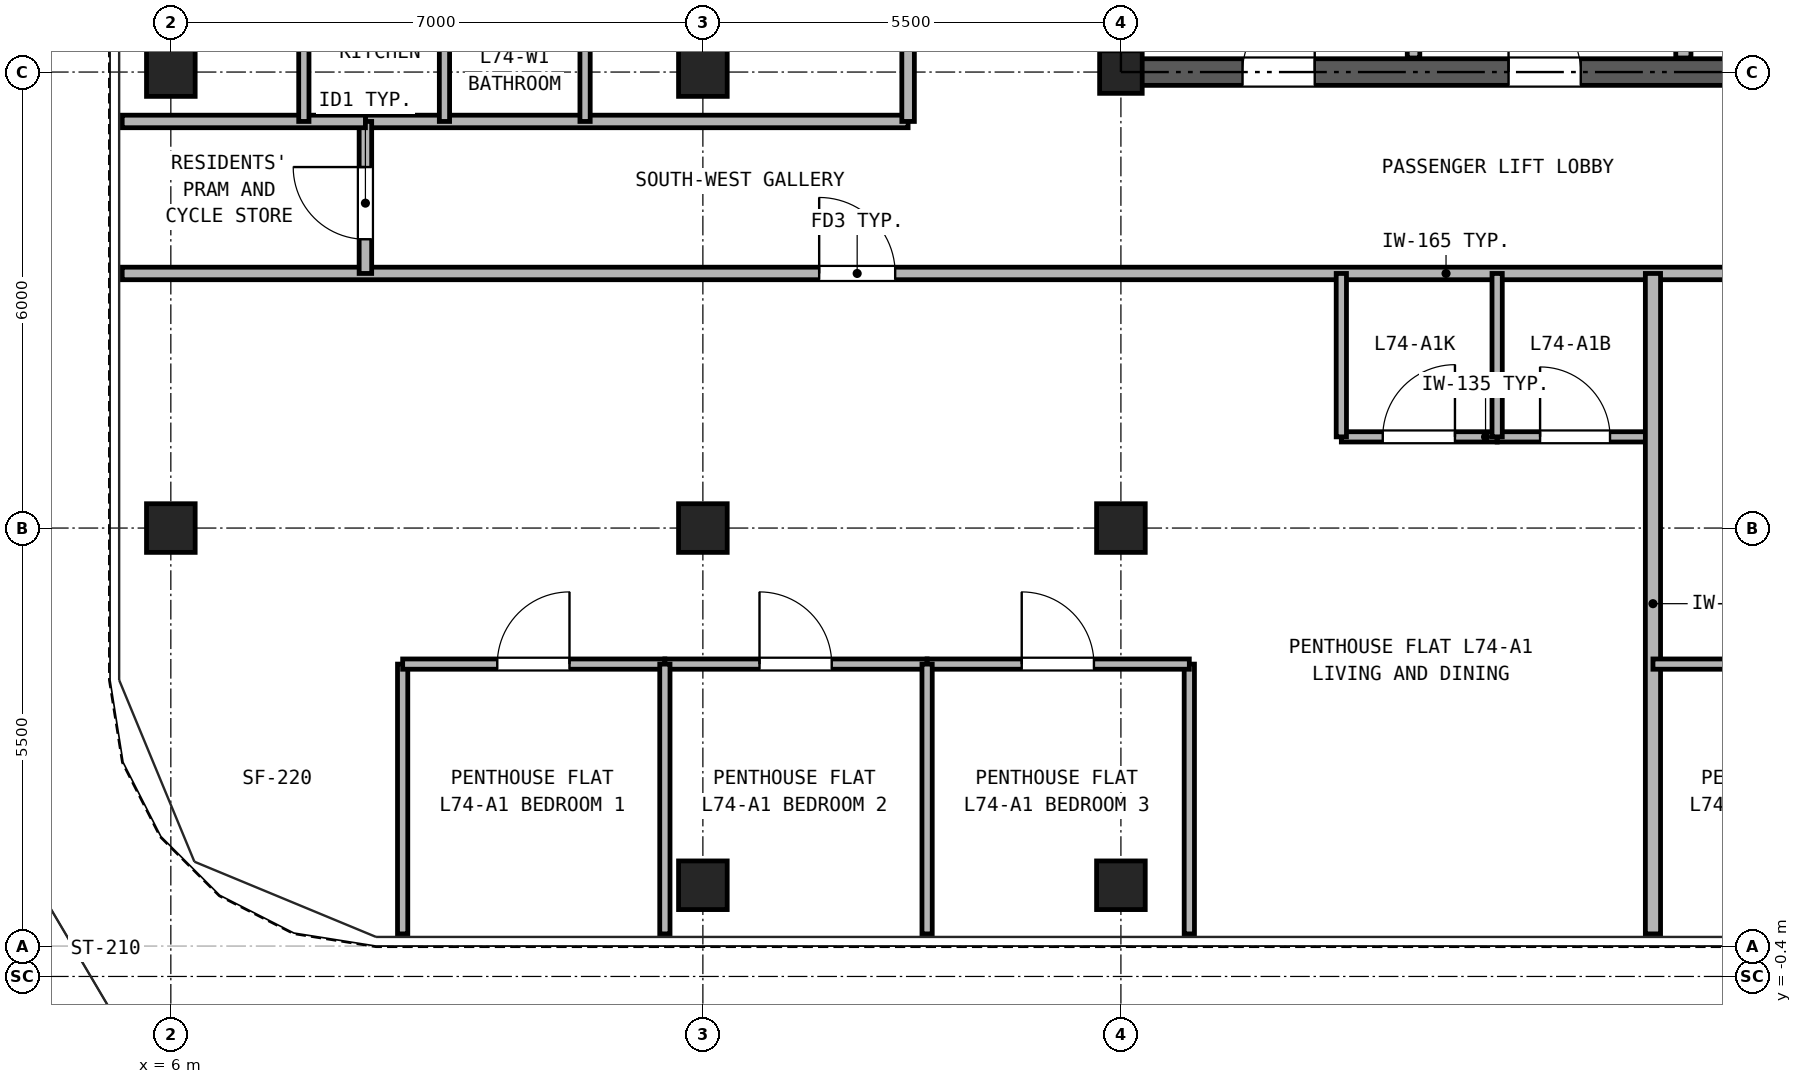
"""IFC4 building model, lengths in metres.
Left out: names, types, materials, properties, quantities, classifications, styles, units other than length and angle.
Written with IfcOpenShell. Run it as: python <this file> out.ifc"""

import sys

from ifc_helpers import new_model, si_unit, direction, frame, frame_2d, origin, origin_2d, place, context, subcontext, project, spatial, rectangle, hollow_rectangle, extrude, source, transform, mapped, element, fill, save


model = new_model("IFC4")
c1 = context("Model", 3, precision=1e-05, world=origin(), true_north=direction((0.0, 1.0)))
c2 = subcontext(c1, "Body", "Model", "MODEL_VIEW")
j1 = project(units=[si_unit("LENGTHUNIT", "METRE"), si_unit("PLANEANGLEUNIT", "RADIAN")], contexts=[c1])
p1 = place(None, origin())
s1 = spatial("IfcSite", under=j1, at=p1, CompositionType="ELEMENT")
p2 = place(p1, origin())
s2 = spatial("IfcBuilding", under=s1, at=p2, CompositionType="ELEMENT")
p3 = place(p2, frame((0.0, 0.0, 258.5)))
s3 = spatial("IfcBuildingStorey", under=s2, at=p3, CompositionType="ELEMENT", Elevation=258.5)
m1 = source(origin(), c2, "Body", "SweptSolid", [
    extrude(hollow_rectangle(XDim=0.64, YDim=0.64, WallThickness=0.035, at=origin_2d()), origin(), (0.0, 0.0, 1.0), 2.98),
])
for number, where, z_axis, x_axis in (
    (1, (13.0, 0.8, 0.0), (0.0, 0.0, 1.0), (1.0, 0.0, 0.0)),
    (2, (18.5, 0.8, 0.0), (0.0, 0.0, 1.0), (1.0, 0.0, 0.0)),
    (3, (6.0, 5.5, 0.0), (0.0, 0.0, 1.0), (1.0, 0.0, 0.0)),
    (4, (6.0, 11.5, 0.0), (0.0, 0.0, 1.0), (1.0, 0.0, 0.0)),
    (5, (13.0, 5.5, 0.0), (0.0, 0.0, 1.0), (1.0, 0.0, 0.0)),
    (6, (13.0, 11.5, 0.0), (0.0, 0.0, 1.0), (1.0, 0.0, 0.0)),
    (7, (18.5, 5.5, 0.0), (0.0, 0.0, 1.0), (1.0, 0.0, 0.0)),
):
    element("IfcColumn", number, at=place(p3, frame(where, z_axis=z_axis, x_axis=x_axis)), inside=s3, PredefinedType="COLUMN", context=c2, shape_type="MappedRepresentation", body=[
        mapped(m1, transform((0.0, 0.0, 0.0), x_axis=(1.0, 0.0, 0.0), y_axis=(0.0, 1.0, 0.0), z_axis=(0.0, 0.0, 1.0), scale=1.0)),
    ])
m2 = source(origin(), c2, "Body", "SweptSolid", [
    extrude(hollow_rectangle(XDim=0.56, YDim=0.56, WallThickness=0.03, at=origin_2d()), origin(), (0.0, 0.0, 1.0), 2.98),
])
p4 = place(p3, frame((18.5, 11.5, 0.0), z_axis=(0.0, 0.0, 1.0), x_axis=(1.0, 0.0, 0.0)))
e8 = element("IfcColumn", 8, at=p4, inside=s3, PredefinedType="COLUMN", context=c2, shape_type="MappedRepresentation", body=[
    mapped(m2, transform((0.0, 0.0, 0.0), x_axis=(1.0, 0.0, 0.0), y_axis=(0.0, 1.0, 0.0), z_axis=(0.0, 0.0, 1.0), scale=1.0)),
])
p5 = place(p3, frame((18.325, 11.5, 0.0), z_axis=(0.0, 0.0, 1.0), x_axis=(1.0, 0.0, 0.0)))
e9 = element("IfcWall", 9, at=p5, inside=s3, PredefinedType="SHEAR", context=c2, shape_type="SweptSolid", body=[
    extrude(rectangle(XDim=10.35, YDim=0.35, at=frame_2d((5.175, 0.0))), origin(), (0.0, 0.0, 1.0), 2.98),
])
p6 = place(p5, frame((1.775, 0.0, 0.0)))
e10 = element("IfcOpeningElement", 10, at=p6, cuts=e9, PredefinedType="OPENING", context=c2, shape_type="SweptSolid", body=[
    extrude(rectangle(XDim=0.95, YDim=2.15, at=frame_2d((0.475, 1.075))), frame((0.0, 0.185, 0.0), z_axis=(0.0, -1.0, 0.0), x_axis=(1.0, 0.0, 0.0)), (0.0, 0.0, 1.0), 0.37),
])
p7 = place(p5, frame((5.275, 0.0, 0.0)))
e11 = element("IfcOpeningElement", 11, at=p7, cuts=e9, PredefinedType="OPENING", context=c2, shape_type="SweptSolid", body=[
    extrude(rectangle(XDim=0.95, YDim=2.15, at=frame_2d((0.475, 1.075))), frame((0.0, 0.185, 0.0), z_axis=(0.0, -1.0, 0.0), x_axis=(1.0, 0.0, 0.0)), (0.0, 0.0, 1.0), 0.37),
])
p8 = place(p5, frame((8.175, 0.0, 0.0)))
e12 = element("IfcOpeningElement", 12, at=p8, cuts=e9, PredefinedType="OPENING", context=c2, shape_type="SweptSolid", body=[
    extrude(rectangle(XDim=1.1, YDim=2.25, at=frame_2d((0.55, 1.125))), frame((0.0, 0.185, 0.0), z_axis=(0.0, -1.0, 0.0), x_axis=(1.0, 0.0, 0.0)), (0.0, 0.0, 1.0), 0.37),
])
p9 = place(p3, frame((18.5, 11.675, 0.0), z_axis=(0.0, 0.0, 1.0), x_axis=(0.0, 1.0, 0.0)))
e13 = element("IfcWall", 13, at=p9, inside=s3, PredefinedType="SHEAR", context=c2, shape_type="SweptSolid", body=[
    extrude(rectangle(XDim=16.9, YDim=0.35, at=frame_2d((8.45, 0.0))), origin(), (0.0, 0.0, 1.0), 2.98),
])
p10 = place(p9, frame((7.475, 0.0, 0.0)))
e14 = element("IfcOpeningElement", 14, at=p10, cuts=e13, PredefinedType="OPENING", context=c2, shape_type="SweptSolid", body=[
    extrude(rectangle(XDim=1.15, YDim=2.2, at=frame_2d((0.575, 1.1))), frame((0.0, 0.185, 0.0), z_axis=(0.0, -1.0, 0.0), x_axis=(1.0, 0.0, 0.0)), (0.0, 0.0, 1.0), 0.37),
])
p11 = place(p3, frame((22.35, 11.685, 0.0), z_axis=(0.0, 0.0, 1.0), x_axis=(0.0, 1.0, 0.0)))
e15 = element("IfcWall", 15, at=p11, inside=s3, PredefinedType="PARTITIONING", context=c2, shape_type="SweptSolid", body=[
    extrude(rectangle(XDim=3.315, YDim=0.165, at=frame_2d((1.657, 0.0))), origin(), (0.0, 0.0, 1.0), 2.98),
])
p12 = place(p3, frame((25.9, 11.685, 0.0), z_axis=(0.0, 0.0, 1.0), x_axis=(0.0, 1.0, 0.0)))
e16 = element("IfcWall", 16, at=p12, inside=s3, PredefinedType="PARTITIONING", context=c2, shape_type="SweptSolid", body=[
    extrude(rectangle(XDim=3.315, YDim=0.2, at=frame_2d((1.657, 0.0))), origin(), (0.0, 0.0, 1.0), 2.98),
])
p13 = place(p3, frame((5.36, 8.85, 0.0), z_axis=(0.0, 0.0, 1.0), x_axis=(1.0, 0.0, 0.0)))
e17 = element("IfcWall", 17, at=p13, inside=s3, PredefinedType="PARTITIONING", context=c2, shape_type="SweptSolid", body=[
    extrude(rectangle(XDim=36.28, YDim=0.165, at=frame_2d((18.14, 0.0))), origin(), (0.0, 0.0, 1.0), 2.98),
])
p14 = place(p13, frame((9.17, 0.0, 0.0)))
e18 = element("IfcOpeningElement", 18, at=p14, cuts=e17, PredefinedType="OPENING", context=c2, shape_type="SweptSolid", body=[
    extrude(rectangle(XDim=1.0, YDim=2.15, at=frame_2d((0.5, 1.075))), frame((0.0, 0.093, 0.0), z_axis=(0.0, -1.0, 0.0), x_axis=(1.0, 0.0, 0.0)), (0.0, 0.0, 1.0), 0.185),
])
p15 = place(p13, frame((24.665, 0.0, 0.0)))
e19 = element("IfcOpeningElement", 19, at=p15, cuts=e17, PredefinedType="OPENING", context=c2, shape_type="SweptSolid", body=[
    extrude(rectangle(XDim=1.0, YDim=2.15, at=frame_2d((0.5, 1.075))), frame((0.0, 0.093, 0.0), z_axis=(0.0, -1.0, 0.0), x_axis=(1.0, 0.0, 0.0)), (0.0, 0.0, 1.0), 0.185),
])
p16 = place(p3, frame((8.56, 10.85, 0.0), z_axis=(0.0, 0.0, 1.0), x_axis=(1.0, 0.0, 0.0)))
e20 = element("IfcWall", 20, at=p16, inside=s3, PredefinedType="PARTITIONING", context=c2, shape_type="SweptSolid", body=[
    extrude(rectangle(XDim=7.14, YDim=0.165, at=frame_2d((3.57, 0.0))), origin(), (0.0, 0.0, 1.0), 2.98),
])
p17 = place(p3, frame((8.56, 8.85, 0.0), z_axis=(0.0, 0.0, 1.0), x_axis=(0.0, 1.0, 0.0)))
e21 = element("IfcWall", 21, at=p17, inside=s3, PredefinedType="PARTITIONING", context=c2, shape_type="SweptSolid", body=[
    extrude(rectangle(XDim=2.0, YDim=0.165, at=frame_2d((1.0, 0.0))), origin(), (0.0, 0.0, 1.0), 2.98),
])
p18 = place(p17, frame((0.45, 0.0, 0.0)))
e22 = element("IfcOpeningElement", 22, at=p18, cuts=e21, PredefinedType="OPENING", context=c2, shape_type="SweptSolid", body=[
    extrude(rectangle(XDim=0.95, YDim=2.15, at=frame_2d((0.475, 1.075))), frame((0.0, 0.093, 0.0), z_axis=(0.0, -1.0, 0.0), x_axis=(1.0, 0.0, 0.0)), (0.0, 0.0, 1.0), 0.185),
])
p19 = place(p3, frame((15.7, 10.85, 0.0), z_axis=(0.0, 0.0, 1.0), x_axis=(0.0, 1.0, 0.0)))
e23 = element("IfcWall", 23, at=p19, inside=s3, PredefinedType="PARTITIONING", context=c2, shape_type="SweptSolid", body=[
    extrude(rectangle(XDim=24.29, YDim=0.165, at=frame_2d((12.145, 0.0))), origin(), (0.0, 0.0, 1.0), 2.98),
])
p20 = place(p19, frame((3.475, 0.0, 0.0)))
e24 = element("IfcOpeningElement", 24, at=p20, cuts=e23, PredefinedType="OPENING", context=c2, shape_type="SweptSolid", body=[
    extrude(rectangle(XDim=1.0, YDim=2.15, at=frame_2d((0.5, 1.075))), frame((0.0, 0.093, 0.0), z_axis=(0.0, -1.0, 0.0), x_axis=(1.0, 0.0, 0.0)), (0.0, 0.0, 1.0), 0.185),
])
p21 = place(p19, frame((11.55, 0.0, 0.0)))
e25 = element("IfcOpeningElement", 25, at=p21, cuts=e23, PredefinedType="OPENING", context=c2, shape_type="SweptSolid", body=[
    extrude(rectangle(XDim=1.0, YDim=2.15, at=frame_2d((0.5, 1.075))), frame((0.0, 0.093, 0.0), z_axis=(0.0, -1.0, 0.0), x_axis=(1.0, 0.0, 0.0)), (0.0, 0.0, 1.0), 0.185),
])
p22 = place(p19, frame((17.55, 0.0, 0.0)))
e26 = element("IfcOpeningElement", 26, at=p22, cuts=e23, PredefinedType="OPENING", context=c2, shape_type="SweptSolid", body=[
    extrude(rectangle(XDim=1.0, YDim=2.15, at=frame_2d((0.5, 1.075))), frame((0.0, 0.093, 0.0), z_axis=(0.0, -1.0, 0.0), x_axis=(1.0, 0.0, 0.0)), (0.0, 0.0, 1.0), 0.185),
])
p23 = place(p3, frame((21.4, 6.7, 0.0), z_axis=(0.0, 0.0, 1.0), x_axis=(1.0, 0.0, 0.0)))
e27 = element("IfcWall", 27, at=p23, inside=s3, PredefinedType="PARTITIONING", context=c2, shape_type="SweptSolid", body=[
    extrude(rectangle(XDim=2.05, YDim=0.135, at=frame_2d((1.025, 0.0))), origin(), (0.0, 0.0, 1.0), 2.98),
])
p24 = place(p23, frame((0.545, 0.0, 0.0)))
e28 = element("IfcOpeningElement", 28, at=p24, cuts=e27, PredefinedType="OPENING", context=c2, shape_type="SweptSolid", body=[
    extrude(rectangle(XDim=0.95, YDim=2.15, at=frame_2d((0.475, 1.075))), frame((0.0, 0.077, 0.0), z_axis=(0.0, -1.0, 0.0), x_axis=(1.0, 0.0, 0.0)), (0.0, 0.0, 1.0), 0.155),
])
p25 = place(p3, frame((23.45, 6.7, 0.0), z_axis=(0.0, 0.0, 1.0), x_axis=(1.0, 0.0, 0.0)))
e29 = element("IfcWall", 29, at=p25, inside=s3, PredefinedType="PARTITIONING", context=c2, shape_type="SweptSolid", body=[
    extrude(rectangle(XDim=2.05, YDim=0.135, at=frame_2d((1.025, 0.0))), origin(), (0.0, 0.0, 1.0), 2.98),
])
p26 = place(p25, frame((0.565, 0.0, 0.0)))
e30 = element("IfcOpeningElement", 30, at=p26, cuts=e29, PredefinedType="OPENING", context=c2, shape_type="SweptSolid", body=[
    extrude(rectangle(XDim=0.92, YDim=2.1, at=frame_2d((0.46, 1.05))), frame((0.0, 0.077, 0.0), z_axis=(0.0, -1.0, 0.0), x_axis=(1.0, 0.0, 0.0)), (0.0, 0.0, 1.0), 0.155),
])
for number, where, z_axis, x_axis in (
    (31, (21.4, 6.7, 0.0), (0.0, 0.0, 1.0), (0.0, 1.0, 0.0)),
    (32, (23.45, 6.7, 0.0), (0.0, 0.0, 1.0), (0.0, 1.0, 0.0)),
):
    element("IfcWall", number, at=place(p3, frame(where, z_axis=z_axis, x_axis=x_axis)), inside=s3, PredefinedType="PARTITIONING", context=c2, shape_type="SweptSolid", body=[
        extrude(rectangle(XDim=2.15, YDim=0.135, at=frame_2d((1.075, 0.0))), origin(), (0.0, 0.0, 1.0), 2.98),
    ])
for number, where, z_axis, x_axis in (
    (33, (9.05, 0.16, 0.0), (0.0, 0.0, 1.0), (0.0, 1.0, 0.0)),
    (34, (19.4, 0.16, 0.0), (0.0, 0.0, 1.0), (0.0, 1.0, 0.0)),
):
    element("IfcWall", number, at=place(p3, frame(where, z_axis=z_axis, x_axis=x_axis)), inside=s3, PredefinedType="PARTITIONING", context=c2, shape_type="SweptSolid", body=[
        extrude(rectangle(XDim=3.55, YDim=0.135, at=frame_2d((1.775, 0.0))), origin(), (0.0, 0.0, 1.0), 2.98),
    ])
p27 = place(p3, frame((9.05, 3.71, 0.0), z_axis=(0.0, 0.0, 1.0), x_axis=(1.0, 0.0, 0.0)))
e35 = element("IfcWall", 35, at=p27, inside=s3, PredefinedType="PARTITIONING", context=c2, shape_type="SweptSolid", body=[
    extrude(rectangle(XDim=3.45, YDim=0.135, at=frame_2d((1.725, 0.0))), origin(), (0.0, 0.0, 1.0), 2.98),
])
p28 = place(p27, frame((1.245, 0.0, 0.0)))
e36 = element("IfcOpeningElement", 36, at=p28, cuts=e35, PredefinedType="OPENING", context=c2, shape_type="SweptSolid", body=[
    extrude(rectangle(XDim=0.95, YDim=2.15, at=frame_2d((0.475, 1.075))), frame((0.0, 0.077, 0.0), z_axis=(0.0, -1.0, 0.0), x_axis=(1.0, 0.0, 0.0)), (0.0, 0.0, 1.0), 0.155),
])
p29 = place(p3, frame((12.5, 3.71, 0.0), z_axis=(0.0, 0.0, 1.0), x_axis=(1.0, 0.0, 0.0)))
e37 = element("IfcWall", 37, at=p29, inside=s3, PredefinedType="PARTITIONING", context=c2, shape_type="SweptSolid", body=[
    extrude(rectangle(XDim=3.45, YDim=0.135, at=frame_2d((1.725, 0.0))), origin(), (0.0, 0.0, 1.0), 2.98),
])
p30 = place(p29, frame((1.245, 0.0, 0.0)))
e38 = element("IfcOpeningElement", 38, at=p30, cuts=e37, PredefinedType="OPENING", context=c2, shape_type="SweptSolid", body=[
    extrude(rectangle(XDim=0.95, YDim=2.15, at=frame_2d((0.475, 1.075))), frame((0.0, 0.077, 0.0), z_axis=(0.0, -1.0, 0.0), x_axis=(1.0, 0.0, 0.0)), (0.0, 0.0, 1.0), 0.155),
])
p31 = place(p3, frame((12.5, 0.16, 0.0), z_axis=(0.0, 0.0, 1.0), x_axis=(0.0, 1.0, 0.0)))
e39 = element("IfcWall", 39, at=p31, inside=s3, PredefinedType="PARTITIONING", context=c2, shape_type="SweptSolid", body=[
    extrude(rectangle(XDim=3.55, YDim=0.135, at=frame_2d((1.775, 0.0))), origin(), (0.0, 0.0, 1.0), 2.98),
])
p32 = place(p3, frame((15.95, 3.71, 0.0), z_axis=(0.0, 0.0, 1.0), x_axis=(1.0, 0.0, 0.0)))
e40 = element("IfcWall", 40, at=p32, inside=s3, PredefinedType="PARTITIONING", context=c2, shape_type="SweptSolid", body=[
    extrude(rectangle(XDim=3.45, YDim=0.135, at=frame_2d((1.725, 0.0))), origin(), (0.0, 0.0, 1.0), 2.98),
])
p33 = place(p32, frame((1.245, 0.0, 0.0)))
e41 = element("IfcOpeningElement", 41, at=p33, cuts=e40, PredefinedType="OPENING", context=c2, shape_type="SweptSolid", body=[
    extrude(rectangle(XDim=0.95, YDim=2.15, at=frame_2d((0.475, 1.075))), frame((0.0, 0.077, 0.0), z_axis=(0.0, -1.0, 0.0), x_axis=(1.0, 0.0, 0.0)), (0.0, 0.0, 1.0), 0.155),
])
p34 = place(p3, frame((15.95, 0.16, 0.0), z_axis=(0.0, 0.0, 1.0), x_axis=(0.0, 1.0, 0.0)))
e42 = element("IfcWall", 42, at=p34, inside=s3, PredefinedType="PARTITIONING", context=c2, shape_type="SweptSolid", body=[
    extrude(rectangle(XDim=3.55, YDim=0.135, at=frame_2d((1.775, 0.0))), origin(), (0.0, 0.0, 1.0), 2.98),
])
p35 = place(p3, frame((25.5, 0.16, 0.0), z_axis=(0.0, 0.0, 1.0), x_axis=(0.0, 1.0, 0.0)))
e43 = element("IfcWall", 43, at=p35, inside=s3, PredefinedType="PARTITIONING", context=c2, shape_type="SweptSolid", body=[
    extrude(rectangle(XDim=8.69, YDim=0.2, at=frame_2d((4.345, 0.0))), origin(), (0.0, 0.0, 1.0), 2.98),
])
p36 = place(p3, frame((25.5, 3.71, 0.0), z_axis=(0.0, 0.0, 1.0), x_axis=(1.0, 0.0, 0.0)))
e44 = element("IfcWall", 44, at=p36, inside=s3, PredefinedType="PARTITIONING", context=c2, shape_type="SweptSolid", body=[
    extrude(rectangle(XDim=3.45, YDim=0.135, at=frame_2d((1.725, 0.0))), origin(), (0.0, 0.0, 1.0), 2.98),
])
p37 = place(p36, frame((1.245, 0.0, 0.0)))
e45 = element("IfcOpeningElement", 45, at=p37, cuts=e44, PredefinedType="OPENING", context=c2, shape_type="SweptSolid", body=[
    extrude(rectangle(XDim=0.95, YDim=2.15, at=frame_2d((0.475, 1.075))), frame((0.0, 0.077, 0.0), z_axis=(0.0, -1.0, 0.0), x_axis=(1.0, 0.0, 0.0)), (0.0, 0.0, 1.0), 0.155),
])
p38 = place(p3, frame((5.36, 10.85, 0.0), z_axis=(0.0, 0.0, 1.0), x_axis=(1.0, 0.0, 0.0)))
e46 = element("IfcWall", 46, at=p38, inside=s3, PredefinedType="PARTITIONING", context=c2, shape_type="SweptSolid", body=[
    extrude(rectangle(XDim=3.2, YDim=0.165, at=frame_2d((1.6, 0.0))), origin(), (0.0, 0.0, 1.0), 2.98),
])
for number, where, z_axis, x_axis in (
    (47, (7.75, 10.85, 0.0), (0.0, 0.0, 1.0), (0.0, 1.0, 0.0)),
    (48, (9.6, 10.85, 0.0), (0.0, 0.0, 1.0), (0.0, 1.0, 0.0)),
    (49, (11.45, 10.85, 0.0), (0.0, 0.0, 1.0), (0.0, 1.0, 0.0)),
):
    element("IfcWall", number, at=place(p3, frame(where, z_axis=z_axis, x_axis=x_axis)), inside=s3, PredefinedType="PARTITIONING", context=c2, shape_type="SweptSolid", body=[
        extrude(rectangle(XDim=2.15, YDim=0.135, at=frame_2d((1.075, 0.0))), origin(), (0.0, 0.0, 1.0), 2.98),
    ])
p39 = place(p6, frame((0.95, 0.0, 0.0), z_axis=(0.0, 0.0, 1.0), x_axis=(-1.0, 0.0, 0.0)))
e50 = element("IfcDoor", 50, at=p39, inside=s3, OperationType="SINGLE_SWING_RIGHT", PredefinedType="DOOR", context=c2, shape_type="SweptSolid", body=[
    extrude(rectangle(XDim=0.95, YDim=2.15, at=frame_2d((0.475, 1.075))), frame((0.0, 0.025, 0.0), z_axis=(0.0, -1.0, 0.0), x_axis=(1.0, 0.0, 0.0)), (0.0, 0.0, 1.0), 0.05),
])
fill(e10, e50)
p40 = place(p7, frame((0.95, 0.0, 0.0), z_axis=(0.0, 0.0, 1.0), x_axis=(-1.0, 0.0, 0.0)))
e51 = element("IfcDoor", 51, at=p40, inside=s3, OperationType="SINGLE_SWING_LEFT", PredefinedType="DOOR", context=c2, shape_type="SweptSolid", body=[
    extrude(rectangle(XDim=0.95, YDim=2.15, at=frame_2d((0.475, 1.075))), frame((0.0, 0.025, 0.0), z_axis=(0.0, -1.0, 0.0), x_axis=(1.0, 0.0, 0.0)), (0.0, 0.0, 1.0), 0.05),
])
fill(e11, e51)
p41 = place(p24, origin())
e52 = element("IfcDoor", 52, at=p41, inside=s3, OperationType="SINGLE_SWING_RIGHT", PredefinedType="DOOR", context=c2, shape_type="SweptSolid", body=[
    extrude(rectangle(XDim=0.95, YDim=2.15, at=frame_2d((0.475, 1.075))), frame((0.0, 0.025, 0.0), z_axis=(0.0, -1.0, 0.0), x_axis=(1.0, 0.0, 0.0)), (0.0, 0.0, 1.0), 0.05),
])
fill(e28, e52)
p42 = place(p26, origin())
e53 = element("IfcDoor", 53, at=p42, inside=s3, OperationType="SINGLE_SWING_LEFT", PredefinedType="DOOR", context=c2, shape_type="SweptSolid", body=[
    extrude(rectangle(XDim=0.92, YDim=2.1, at=frame_2d((0.46, 1.05))), frame((0.0, 0.025, 0.0), z_axis=(0.0, -1.0, 0.0), x_axis=(1.0, 0.0, 0.0)), (0.0, 0.0, 1.0), 0.05),
])
fill(e30, e53)
p43 = place(p28, frame((0.95, 0.0, 0.0), z_axis=(0.0, 0.0, 1.0), x_axis=(-1.0, 0.0, 0.0)))
e54 = element("IfcDoor", 54, at=p43, inside=s3, OperationType="SINGLE_SWING_RIGHT", PredefinedType="DOOR", context=c2, shape_type="SweptSolid", body=[
    extrude(rectangle(XDim=0.95, YDim=2.15, at=frame_2d((0.475, 1.075))), frame((0.0, 0.025, 0.0), z_axis=(0.0, -1.0, 0.0), x_axis=(1.0, 0.0, 0.0)), (0.0, 0.0, 1.0), 0.05),
])
fill(e36, e54)
p44 = place(p30, frame((0.95, 0.0, 0.0), z_axis=(0.0, 0.0, 1.0), x_axis=(-1.0, 0.0, 0.0)))
e55 = element("IfcDoor", 55, at=p44, inside=s3, OperationType="SINGLE_SWING_LEFT", PredefinedType="DOOR", context=c2, shape_type="SweptSolid", body=[
    extrude(rectangle(XDim=0.95, YDim=2.15, at=frame_2d((0.475, 1.075))), frame((0.0, 0.025, 0.0), z_axis=(0.0, -1.0, 0.0), x_axis=(1.0, 0.0, 0.0)), (0.0, 0.0, 1.0), 0.05),
])
fill(e38, e55)
p45 = place(p33, frame((0.95, 0.0, 0.0), z_axis=(0.0, 0.0, 1.0), x_axis=(-1.0, 0.0, 0.0)))
e56 = element("IfcDoor", 56, at=p45, inside=s3, OperationType="SINGLE_SWING_LEFT", PredefinedType="DOOR", context=c2, shape_type="SweptSolid", body=[
    extrude(rectangle(XDim=0.95, YDim=2.15, at=frame_2d((0.475, 1.075))), frame((0.0, 0.025, 0.0), z_axis=(0.0, -1.0, 0.0), x_axis=(1.0, 0.0, 0.0)), (0.0, 0.0, 1.0), 0.05),
])
fill(e41, e56)
p46 = place(p14, frame((1.0, 0.0, 0.0), z_axis=(0.0, 0.0, 1.0), x_axis=(-1.0, 0.0, 0.0)))
e57 = element("IfcDoor", 57, at=p46, inside=s3, OperationType="SINGLE_SWING_LEFT", PredefinedType="DOOR", context=c2, shape_type="SweptSolid", body=[
    extrude(rectangle(XDim=1.0, YDim=2.15, at=frame_2d((0.5, 1.075))), frame((0.0, 0.025, 0.0), z_axis=(0.0, -1.0, 0.0), x_axis=(1.0, 0.0, 0.0)), (0.0, 0.0, 1.0), 0.05),
])
fill(e18, e57)
p47 = place(p18, frame((0.95, 0.0, 0.0), z_axis=(0.0, 0.0, 1.0), x_axis=(-1.0, 0.0, 0.0)))
e58 = element("IfcDoor", 58, at=p47, inside=s3, OperationType="SINGLE_SWING_RIGHT", PredefinedType="DOOR", context=c2, shape_type="SweptSolid", body=[
    extrude(rectangle(XDim=0.95, YDim=2.15, at=frame_2d((0.475, 1.075))), frame((0.0, 0.025, 0.0), z_axis=(0.0, -1.0, 0.0), x_axis=(1.0, 0.0, 0.0)), (0.0, 0.0, 1.0), 0.05),
])
fill(e22, e58)
save(model, sys.argv[1])
